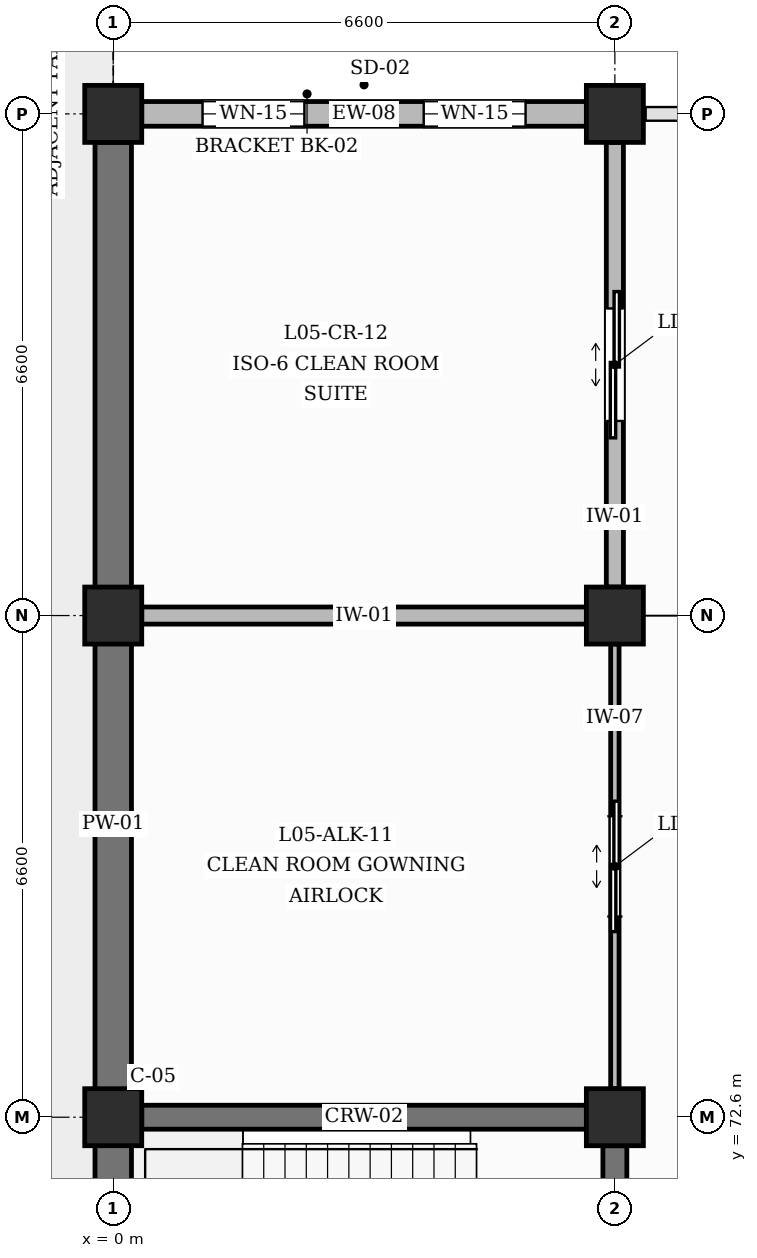
"""IFC4 building model, lengths in metres.
Left out: names, types, materials, properties, quantities, classifications, styles, units other than length and angle.
Written with IfcOpenShell. Run it as: python <this file> out.ifc"""

import sys

from ifc_helpers import new_model, si_unit, direction, frame, frame_2d, origin, origin_2d, place, context, subcontext, project, spatial, rectangle, extrude, element, fill, save


model = new_model("IFC4")
c1 = context("Model", 3, precision=1e-05, world=origin(), true_north=direction((0.0, 1.0)))
c2 = subcontext(c1, "Body", "Model", "MODEL_VIEW")
j1 = project(units=[si_unit("LENGTHUNIT", "METRE"), si_unit("PLANEANGLEUNIT", "RADIAN")], contexts=[c1])
p1 = place(None, origin())
s1 = spatial("IfcSite", under=j1, at=p1, CompositionType="ELEMENT")
p2 = place(p1, origin())
s2 = spatial("IfcBuilding", under=s1, at=p2, CompositionType="ELEMENT")
p3 = place(p2, frame((0.0, 0.0, 22.8)))
s3 = spatial("IfcBuildingStorey", under=s2, at=p3, CompositionType="ELEMENT", Elevation=22.8)
for number, where, z_axis, x_axis in (
    (1, (0.0, 72.6, 0.0), (0.0, 0.0, 1.0), (1.0, 0.0, 0.0)),
    (2, (0.0, 79.2, 0.0), (0.0, 0.0, 1.0), (1.0, 0.0, 0.0)),
    (3, (0.0, 85.8, 0.0), (0.0, 0.0, 1.0), (1.0, 0.0, 0.0)),
    (4, (6.6, 72.6, 0.0), (0.0, 0.0, 1.0), (1.0, 0.0, 0.0)),
    (5, (6.6, 79.2, 0.0), (0.0, 0.0, 1.0), (1.0, 0.0, 0.0)),
    (6, (6.6, 85.8, 0.0), (0.0, 0.0, 1.0), (1.0, 0.0, 0.0)),
):
    element("IfcColumn", number, at=place(p3, frame(where, z_axis=z_axis, x_axis=x_axis)), inside=s3, PredefinedType="COLUMN", context=c2, shape_type="SweptSolid", body=[
        extrude(rectangle(XDim=0.75, YDim=0.75, at=origin_2d()), origin(), (0.0, 0.0, 1.0), 4.2),
    ])
p4 = place(p3, frame((0.0, 66.375, 0.0), z_axis=(0.0, 0.0, 1.0), x_axis=(0.0, 1.0, 0.0)))
e7 = element("IfcWall", 7, at=p4, inside=s3, PredefinedType="SOLIDWALL", context=c2, shape_type="SweptSolid", body=[
    extrude(rectangle(XDim=5.85, YDim=0.48, at=frame_2d((2.925, 0.0))), origin(), (0.0, 0.0, 1.0), 3.27),
])
p5 = place(p3, frame((0.0, 72.975, 0.0), z_axis=(0.0, 0.0, 1.0), x_axis=(0.0, 1.0, 0.0)))
e8 = element("IfcWall", 8, at=p5, inside=s3, PredefinedType="SOLIDWALL", context=c2, shape_type="SweptSolid", body=[
    extrude(rectangle(XDim=5.85, YDim=0.48, at=frame_2d((2.925, 0.0))), origin(), (0.0, 0.0, 1.0), 3.27),
])
p6 = place(p3, frame((0.375, 85.8, 0.0), z_axis=(0.0, 0.0, 1.0), x_axis=(1.0, 0.0, 0.0)))
e9 = element("IfcWall", 9, at=p6, inside=s3, PredefinedType="SOLIDWALL", context=c2, shape_type="SweptSolid", body=[
    extrude(rectangle(XDim=5.85, YDim=0.325, at=frame_2d((2.925, 0.0))), origin(), (0.0, 0.0, 1.0), 3.27),
])
p7 = place(p6, frame((0.8, 0.0, 0.95)))
e10 = element("IfcOpeningElement", 10, at=p7, cuts=e9, PredefinedType="OPENING", context=c2, shape_type="SweptSolid", body=[
    extrude(rectangle(XDim=1.34, YDim=1.74, at=frame_2d((0.67, 0.87))), frame((0.0, 0.172, 0.0), z_axis=(0.0, -1.0, 0.0), x_axis=(1.0, 0.0, 0.0)), (0.0, 0.0, 1.0), 0.345),
])
p8 = place(p6, frame((3.71, 0.0, 0.95)))
e11 = element("IfcOpeningElement", 11, at=p8, cuts=e9, PredefinedType="OPENING", context=c2, shape_type="SweptSolid", body=[
    extrude(rectangle(XDim=1.34, YDim=1.74, at=frame_2d((0.67, 0.87))), frame((0.0, 0.172, 0.0), z_axis=(0.0, -1.0, 0.0), x_axis=(1.0, 0.0, 0.0)), (0.0, 0.0, 1.0), 0.345),
])
p9 = place(p3, frame((0.0, 79.575, 0.0), z_axis=(0.0, 0.0, 1.0), x_axis=(0.0, 1.0, 0.0)))
e12 = element("IfcWall", 12, at=p9, inside=s3, PredefinedType="SOLIDWALL", context=c2, shape_type="SweptSolid", body=[
    extrude(rectangle(XDim=5.85, YDim=0.48, at=frame_2d((2.925, 0.0))), origin(), (0.0, 0.0, 1.0), 3.27),
])
p10 = place(p3, frame((0.375, 72.6, 0.0), z_axis=(0.0, 0.0, 1.0), x_axis=(1.0, 0.0, 0.0)))
e13 = element("IfcWall", 13, at=p10, inside=s3, PredefinedType="SHEAR", context=c2, shape_type="SweptSolid", body=[
    extrude(rectangle(XDim=5.85, YDim=0.315, at=frame_2d((2.925, 0.0))), origin(), (0.0, 0.0, 1.0), 3.17),
])
p11 = place(p3, frame((6.6, 66.375, 0.0), z_axis=(0.0, 0.0, 1.0), x_axis=(0.0, 1.0, 0.0)))
e14 = element("IfcWall", 14, at=p11, inside=s3, PredefinedType="SHEAR", context=c2, shape_type="SweptSolid", body=[
    extrude(rectangle(XDim=5.85, YDim=0.315, at=frame_2d((2.925, 0.0))), origin(), (0.0, 0.0, 1.0), 3.17),
])
p12 = place(p11, frame((2.375, 0.0, 0.0)))
e15 = element("IfcOpeningElement", 15, at=p12, cuts=e14, PredefinedType="OPENING", context=c2, shape_type="SweptSolid", body=[
    extrude(rectangle(XDim=1.1, YDim=2.15, at=frame_2d((0.55, 1.075))), frame((0.0, 0.167, 0.0), z_axis=(0.0, -1.0, 0.0), x_axis=(1.0, 0.0, 0.0)), (0.0, 0.0, 1.0), 0.335),
])
p13 = place(p3, frame((6.6, 72.975, 0.0), z_axis=(0.0, 0.0, 1.0), x_axis=(0.0, 1.0, 0.0)))
e16 = element("IfcWall", 16, at=p13, inside=s3, PredefinedType="PARTITIONING", context=c2, shape_type="SweptSolid", body=[
    extrude(rectangle(XDim=5.85, YDim=0.11, at=frame_2d((2.925, 0.0))), origin(), (0.0, 0.0, 1.0), 3.17),
])
p14 = place(p13, frame((2.265, 0.0, 0.0)))
e17 = element("IfcOpeningElement", 17, at=p14, cuts=e16, PredefinedType="OPENING", context=c2, shape_type="SweptSolid", body=[
    extrude(rectangle(XDim=1.32, YDim=2.2, at=frame_2d((0.66, 1.1))), frame((0.0, 0.065, 0.0), z_axis=(0.0, -1.0, 0.0), x_axis=(1.0, 0.0, 0.0)), (0.0, 0.0, 1.0), 0.13),
])
p15 = place(p3, frame((0.375, 79.2, 0.0), z_axis=(0.0, 0.0, 1.0), x_axis=(1.0, 0.0, 0.0)))
e18 = element("IfcWall", 18, at=p15, inside=s3, PredefinedType="PARTITIONING", context=c2, shape_type="SweptSolid", body=[
    extrude(rectangle(XDim=5.85, YDim=0.225, at=frame_2d((2.925, 0.0))), origin(), (0.0, 0.0, 1.0), 3.17),
])
p16 = place(p3, frame((6.6, 79.575, 0.0), z_axis=(0.0, 0.0, 1.0), x_axis=(0.0, 1.0, 0.0)))
e19 = element("IfcWall", 19, at=p16, inside=s3, PredefinedType="PARTITIONING", context=c2, shape_type="SweptSolid", body=[
    extrude(rectangle(XDim=5.85, YDim=0.225, at=frame_2d((2.925, 0.0))), origin(), (0.0, 0.0, 1.0), 3.17),
])
p17 = place(p16, frame((2.185, 0.0, 0.0)))
e20 = element("IfcOpeningElement", 20, at=p17, cuts=e19, PredefinedType="OPENING", context=c2, shape_type="SweptSolid", body=[
    extrude(rectangle(XDim=1.48, YDim=2.25, at=frame_2d((0.74, 1.125))), frame((0.0, 0.123, 0.0), z_axis=(0.0, -1.0, 0.0), x_axis=(1.0, 0.0, 0.0)), (0.0, 0.0, 1.0), 0.245),
])
p18 = place(p7, origin())
e21 = element("IfcWindow", 21, at=p18, inside=s3, PartitioningType="SINGLE_PANEL", PredefinedType="WINDOW", context=c2, shape_type="SweptSolid", body=[
    extrude(rectangle(XDim=1.34, YDim=1.74, at=frame_2d((0.67, 0.87))), frame((0.0, 0.03, 0.0), z_axis=(0.0, -1.0, 0.0), x_axis=(1.0, 0.0, 0.0)), (0.0, 0.0, 1.0), 0.06),
])
fill(e10, e21)
p19 = place(p8, origin())
e22 = element("IfcWindow", 22, at=p19, inside=s3, PartitioningType="SINGLE_PANEL", PredefinedType="WINDOW", context=c2, shape_type="SweptSolid", body=[
    extrude(rectangle(XDim=1.34, YDim=1.74, at=frame_2d((0.67, 0.87))), frame((0.0, 0.03, 0.0), z_axis=(0.0, -1.0, 0.0), x_axis=(1.0, 0.0, 0.0)), (0.0, 0.0, 1.0), 0.06),
])
fill(e11, e22)
p20 = place(p14, origin())
e23 = element("IfcDoor", 23, at=p20, inside=s3, OperationType="DOUBLE_DOOR_SLIDING", PredefinedType="USERDEFINED", context=c2, shape_type="SweptSolid", body=[
    extrude(rectangle(XDim=1.32, YDim=2.2, at=frame_2d((0.66, 1.1))), frame((0.0, 0.025, 0.0), z_axis=(0.0, -1.0, 0.0), x_axis=(1.0, 0.0, 0.0)), (0.0, 0.0, 1.0), 0.05),
])
fill(e17, e23)
p21 = place(p17, origin())
e24 = element("IfcDoor", 24, at=p21, inside=s3, OperationType="DOUBLE_DOOR_SLIDING", PredefinedType="USERDEFINED", context=c2, shape_type="SweptSolid", body=[
    extrude(rectangle(XDim=1.48, YDim=2.25, at=frame_2d((0.74, 1.125))), frame((0.0, 0.025, 0.0), z_axis=(0.0, -1.0, 0.0), x_axis=(1.0, 0.0, 0.0)), (0.0, 0.0, 1.0), 0.05),
])
fill(e20, e24)
save(model, sys.argv[1])
